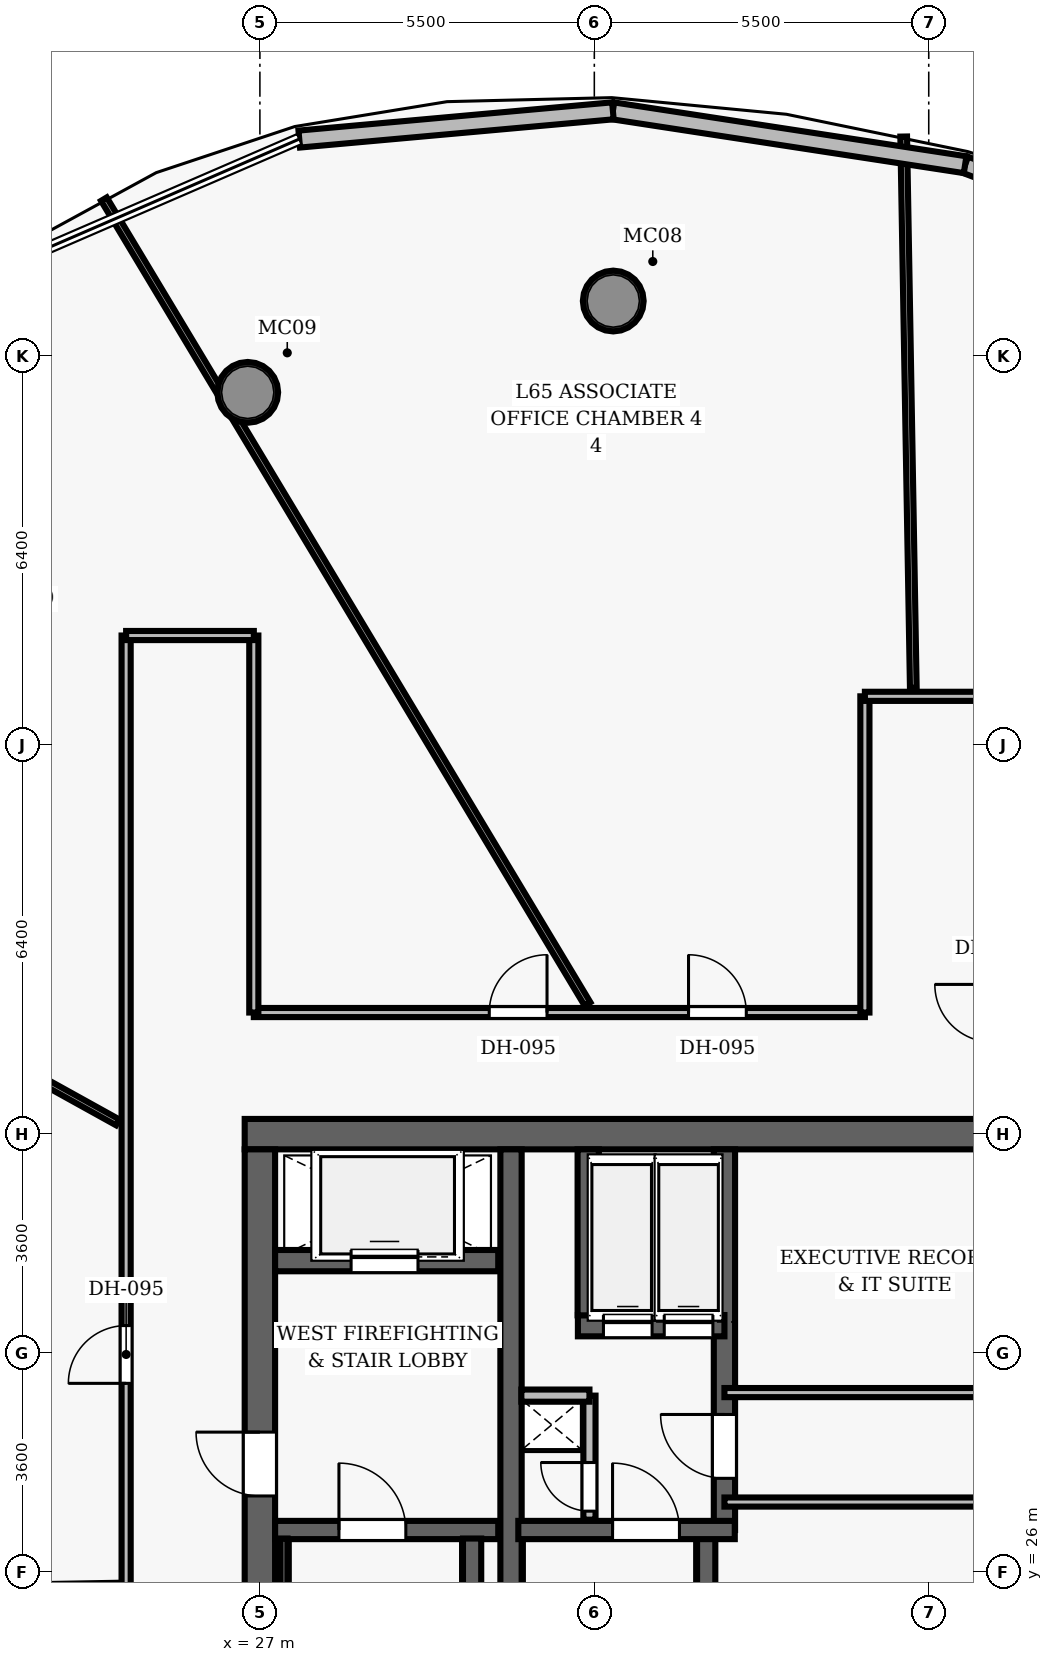
"""IFC4 building model, lengths in metres.
Left out: names, types, materials, properties, quantities, classifications, styles, units other than length and angle.
Written with IfcOpenShell. Run it as: python <this file> out.ifc"""

import sys

from ifc_helpers import new_model, si_unit, direction, frame, frame_2d, origin, origin_2d, place, context, subcontext, project, spatial, rectangle, hollow_circle, extrude, element, fill, save


model = new_model("IFC4")
c1 = context("Model", 3, precision=1e-05, world=origin(), true_north=direction((0.0, 1.0)))
c2 = subcontext(c1, "Body", "Model", "MODEL_VIEW")
j1 = project(units=[si_unit("LENGTHUNIT", "METRE"), si_unit("PLANEANGLEUNIT", "RADIAN")], contexts=[c1])
p1 = place(None, origin())
s1 = spatial("IfcSite", under=j1, at=p1, CompositionType="ELEMENT")
p2 = place(p1, origin())
s2 = spatial("IfcBuilding", under=s1, at=p2, CompositionType="ELEMENT")
p3 = place(p2, frame((0.0, 0.0, 257.45)))
s3 = spatial("IfcBuildingStorey", under=s2, at=p3, CompositionType="ELEMENT", Elevation=257.45)
p4 = place(p3, frame((26.75, 33.2, 0.0), z_axis=(0.0, 0.0, 1.0), x_axis=(1.0, 0.0, 0.0)))
e1 = element("IfcWall", 1, at=p4, inside=s3, PredefinedType="SHEAR", context=c2, shape_type="SweptSolid", body=[
    extrude(rectangle(XDim=22.5, YDim=0.5, at=frame_2d((11.25, 0.0))), origin(), (0.0, 0.0, 1.0), 3.85),
])
p5 = place(p3, frame((27.0, 19.05, 0.0), z_axis=(0.0, 0.0, 1.0), x_axis=(0.0, 1.0, 0.0)))
e2 = element("IfcWall", 2, at=p5, inside=s3, PredefinedType="SHEAR", context=c2, shape_type="SweptSolid", body=[
    extrude(rectangle(XDim=13.9, YDim=0.5, at=frame_2d((6.95, 0.0))), origin(), (0.0, 0.0, 1.0), 3.85),
])
p6 = place(p5, frame((8.2, 0.0, 0.0)))
e3 = element("IfcOpeningElement", 3, at=p6, cuts=e2, PredefinedType="OPENING", context=c2, shape_type="SweptSolid", body=[
    extrude(rectangle(XDim=1.05, YDim=2.15, at=frame_2d((0.525, 1.075))), frame((0.0, 0.26, 0.0), z_axis=(0.0, -1.0, 0.0), x_axis=(1.0, 0.0, 0.0)), (0.0, 0.0, 1.0), 0.52),
])
p7 = place(p3, frame((31.13, 19.05, 0.0), z_axis=(0.0, 0.0, 1.0), x_axis=(0.0, 1.0, 0.0)))
e4 = element("IfcWall", 4, at=p7, inside=s3, PredefinedType="SHEAR", context=c2, shape_type="SweptSolid", body=[
    extrude(rectangle(XDim=13.9, YDim=0.35, at=frame_2d((6.95, 0.0))), origin(), (0.0, 0.0, 1.0), 3.85),
])
for number, where, z_axis, x_axis in (
    (5, (32.812, 46.901, 0.0), (0.0, 0.0, 1.0), (1.0, 0.0, 0.0)),
    (6, (26.8, 45.399, 0.0), (0.0, 0.0, 1.0), (1.0, 0.0, 0.0)),
):
    element("IfcColumn", number, at=place(p3, frame(where, z_axis=z_axis, x_axis=x_axis)), inside=s3, PredefinedType="COLUMN", context=c2, shape_type="SweptSolid", body=[
        extrude(hollow_circle(Radius=0.5, WallThickness=0.045, at=origin_2d()), origin(), (0.0, 0.0, 1.0), 3.85),
    ])
p8 = place(p3, frame((27.25, 26.69, 0.0), z_axis=(0.0, 0.0, 1.0), x_axis=(1.0, 0.0, 0.0)))
e7 = element("IfcWall", 7, at=p8, inside=s3, PredefinedType="SHEAR", context=c2, shape_type="SweptSolid", body=[
    extrude(rectangle(XDim=3.67, YDim=0.3, at=frame_2d((1.835, 0.0))), origin(), (0.0, 0.0, 1.0), 3.85),
])
p9 = place(p8, frame((1.05, 0.0, 0.0)))
e8 = element("IfcOpeningElement", 8, at=p9, cuts=e7, PredefinedType="OPENING", context=c2, shape_type="SweptSolid", body=[
    extrude(rectangle(XDim=1.1, YDim=2.15, at=frame_2d((0.55, 1.075))), frame((0.0, 0.16, 0.0), z_axis=(0.0, -1.0, 0.0), x_axis=(1.0, 0.0, 0.0)), (0.0, 0.0, 1.0), 0.32),
])
p10 = place(p3, frame((30.49, 19.05, 0.0), z_axis=(0.0, 0.0, 1.0), x_axis=(0.0, 1.0, 0.0)))
e9 = element("IfcWall", 9, at=p10, inside=s3, PredefinedType="SHEAR", context=c2, shape_type="SweptSolid", body=[
    extrude(rectangle(XDim=7.5, YDim=0.3, at=frame_2d((3.75, 0.0))), origin(), (0.0, 0.0, 1.0), 3.85),
])
p11 = place(p3, frame((27.395, 19.1, 0.0), z_axis=(0.0, 0.0, 1.0), x_axis=(0.0, 1.0, 0.0)))
e10 = element("IfcWall", 10, at=p11, inside=s3, PredefinedType="SHEAR", context=c2, shape_type="SweptSolid", body=[
    extrude(rectangle(XDim=7.45, YDim=0.12, at=frame_2d((3.725, 0.0))), origin(), (0.0, 0.0, 1.0), 3.85),
])
p12 = place(p3, frame((27.25, 31.12, 0.0), z_axis=(0.0, 0.0, 1.0), x_axis=(1.0, 0.0, 0.0)))
e11 = element("IfcWall", 11, at=p12, inside=s3, PredefinedType="SHEAR", context=c2, shape_type="SweptSolid", body=[
    extrude(rectangle(XDim=3.67, YDim=0.35, at=frame_2d((1.835, 0.0))), origin(), (0.0, 0.0, 1.0), 3.04),
])
p13 = place(p12, frame((1.25, 0.0, 0.0)))
e12 = element("IfcOpeningElement", 12, at=p13, cuts=e11, PredefinedType="OPENING", context=c2, shape_type="SweptSolid", body=[
    extrude(rectangle(XDim=1.1, YDim=2.15, at=frame_2d((0.55, 1.075))), frame((0.0, 0.185, 0.0), z_axis=(0.0, -1.0, 0.0), x_axis=(1.0, 0.0, 0.0)), (0.0, 0.0, 1.0), 0.37),
])
p14 = place(p3, frame((34.34, 19.05, 0.0), z_axis=(0.0, 0.0, 1.0), x_axis=(0.0, 1.0, 0.0)))
e13 = element("IfcWall", 13, at=p14, inside=s3, PredefinedType="SHEAR", context=c2, shape_type="SweptSolid", body=[
    extrude(rectangle(XDim=7.5, YDim=0.3, at=frame_2d((3.75, 0.0))), origin(), (0.0, 0.0, 1.0), 3.85),
])
p15 = place(p3, frame((34.64, 26.69, 0.0), z_axis=(0.0, 0.0, 1.0), x_axis=(0.0, 1.0, 0.0)))
e14 = element("IfcWall", 14, at=p15, inside=s3, PredefinedType="SHEAR", context=c2, shape_type="SweptSolid", body=[
    extrude(rectangle(XDim=6.26, YDim=0.35, at=frame_2d((3.13, 0.0))), origin(), (0.0, 0.0, 1.0), 3.85),
])
p16 = place(p15, frame((0.85, 0.0, 0.0)))
e15 = element("IfcOpeningElement", 15, at=p16, cuts=e14, PredefinedType="OPENING", context=c2, shape_type="SweptSolid", body=[
    extrude(rectangle(XDim=1.05, YDim=2.15, at=frame_2d((0.525, 1.075))), frame((0.0, 0.185, 0.0), z_axis=(0.0, -1.0, 0.0), x_axis=(1.0, 0.0, 0.0)), (0.0, 0.0, 1.0), 0.37),
])
p17 = place(p3, frame((31.25, 26.69, 0.0), z_axis=(0.0, 0.0, 1.0), x_axis=(1.0, 0.0, 0.0)))
e16 = element("IfcWall", 16, at=p17, inside=s3, PredefinedType="SHEAR", context=c2, shape_type="SweptSolid", body=[
    extrude(rectangle(XDim=3.56, YDim=0.3, at=frame_2d((1.78, 0.0))), origin(), (0.0, 0.0, 1.0), 3.85),
])
p18 = place(p17, frame((1.55, 0.0, 0.0)))
e17 = element("IfcOpeningElement", 17, at=p18, cuts=e16, PredefinedType="OPENING", context=c2, shape_type="SweptSolid", body=[
    extrude(rectangle(XDim=1.1, YDim=2.15, at=frame_2d((0.55, 1.075))), frame((0.0, 0.16, 0.0), z_axis=(0.0, -1.0, 0.0), x_axis=(1.0, 0.0, 0.0)), (0.0, 0.0, 1.0), 0.32),
])
p19 = place(p3, frame((32.23, 30.05, 0.0), z_axis=(0.0, 0.0, 1.0), x_axis=(1.0, 0.0, 0.0)))
e18 = element("IfcWall", 18, at=p19, inside=s3, PredefinedType="SHEAR", context=c2, shape_type="SweptSolid", body=[
    extrude(rectangle(XDim=2.41, YDim=0.35, at=frame_2d((1.205, 0.0))), origin(), (0.0, 0.0, 1.0), 3.04),
])
p20 = place(p19, frame((0.42, 0.0, 0.0)))
e19 = element("IfcOpeningElement", 19, at=p20, cuts=e18, PredefinedType="OPENING", context=c2, shape_type="SweptSolid", body=[
    extrude(rectangle(XDim=0.8, YDim=2.15, at=frame_2d((0.4, 1.075))), frame((0.0, 0.185, 0.0), z_axis=(0.0, -1.0, 0.0), x_axis=(1.0, 0.0, 0.0)), (0.0, 0.0, 1.0), 0.37),
])
p21 = place(p19, frame((1.42, 0.0, 0.0)))
e20 = element("IfcOpeningElement", 20, at=p21, cuts=e18, PredefinedType="OPENING", context=c2, shape_type="SweptSolid", body=[
    extrude(rectangle(XDim=0.8, YDim=2.15, at=frame_2d((0.4, 1.075))), frame((0.0, 0.185, 0.0), z_axis=(0.0, -1.0, 0.0), x_axis=(1.0, 0.0, 0.0)), (0.0, 0.0, 1.0), 0.37),
])
p22 = place(p3, frame((32.4, 30.22, 0.0), z_axis=(0.0, 0.0, 1.0), x_axis=(0.0, 1.0, 0.0)))
e21 = element("IfcWall", 21, at=p22, inside=s3, PredefinedType="SHEAR", context=c2, shape_type="SweptSolid", body=[
    extrude(rectangle(XDim=2.73, YDim=0.35, at=frame_2d((1.365, 0.0))), origin(), (0.0, 0.0, 1.0), 3.04),
])
p23 = place(p3, frame((32.42, 26.86, 0.0), z_axis=(0.0, 0.0, 1.0), x_axis=(0.0, 1.0, 0.0)))
e22 = element("IfcWall", 22, at=p23, inside=s3, PredefinedType="PARTITIONING", context=c2, shape_type="SweptSolid", body=[
    extrude(rectangle(XDim=2.04, YDim=0.2, at=frame_2d((1.02, 0.0))), origin(), (0.0, 0.0, 1.0), 3.04),
])
p24 = place(p23, frame((0.14, 0.0, 0.0)))
e23 = element("IfcOpeningElement", 23, at=p24, cuts=e22, PredefinedType="OPENING", context=c2, shape_type="SweptSolid", body=[
    extrude(rectangle(XDim=0.8, YDim=2.05, at=frame_2d((0.4, 1.025))), frame((0.0, 0.11, 0.0), z_axis=(0.0, -1.0, 0.0), x_axis=(1.0, 0.0, 0.0)), (0.0, 0.0, 1.0), 0.22),
])
p25 = place(p3, frame((31.3, 28.9, 0.0), z_axis=(0.0, 0.0, 1.0), x_axis=(1.0, 0.0, 0.0)))
e24 = element("IfcWall", 24, at=p25, inside=s3, PredefinedType="PARTITIONING", context=c2, shape_type="SweptSolid", body=[
    extrude(rectangle(XDim=1.12, YDim=0.2, at=frame_2d((0.56, 0.0))), origin(), (0.0, 0.0, 1.0), 3.04),
])
for number, where, z_axis, x_axis in (
    (25, (34.64, 27.15, 0.0), (0.0, 0.0, 1.0), (1.0, 0.0, 0.0)),
    (26, (34.64, 28.95, 0.0), (0.0, 0.0, 1.0), (1.0, 0.0, 0.0)),
):
    element("IfcWall", number, at=place(p3, frame(where, z_axis=z_axis, x_axis=x_axis)), inside=s3, PredefinedType="PARTITIONING", context=c2, shape_type="SweptSolid", body=[
        extrude(rectangle(XDim=6.36, YDim=0.15, at=frame_2d((3.18, 0.0))), origin(), (0.0, 0.0, 1.0), 3.04),
    ])
p26 = place(p3, frame((26.9, 35.2, 0.0), z_axis=(0.0, 0.0, 1.0), x_axis=(1.0, 0.0, 0.0)))
e27 = element("IfcWall", 27, at=p26, inside=s3, PredefinedType="PARTITIONING", context=c2, shape_type="SweptSolid", body=[
    extrude(rectangle(XDim=10.05, YDim=0.15, at=frame_2d((5.025, 0.0))), origin(), (0.0, 0.0, 1.0), 3.04),
])
p27 = place(p26, frame((7.149, 0.0, 0.0)))
e28 = element("IfcOpeningElement", 28, at=p27, cuts=e27, PredefinedType="OPENING", context=c2, shape_type="SweptSolid", body=[
    extrude(rectangle(XDim=0.95, YDim=2.15, at=frame_2d((0.475, 1.075))), frame((0.0, 0.085, 0.0), z_axis=(0.0, -1.0, 0.0), x_axis=(1.0, 0.0, 0.0)), (0.0, 0.0, 1.0), 0.17),
])
p28 = place(p26, frame((3.872, 0.0, 0.0)))
e29 = element("IfcOpeningElement", 29, at=p28, cuts=e27, PredefinedType="OPENING", context=c2, shape_type="SweptSolid", body=[
    extrude(rectangle(XDim=0.95, YDim=2.15, at=frame_2d((0.475, 1.075))), frame((0.0, 0.085, 0.0), z_axis=(0.0, -1.0, 0.0), x_axis=(1.0, 0.0, 0.0)), (0.0, 0.0, 1.0), 0.17),
])
p29 = place(p3, frame((24.8, 11.321, 0.0), z_axis=(0.0, 0.0, 1.0), x_axis=(0.0, 1.0, 0.0)))
e30 = element("IfcWall", 30, at=p29, inside=s3, PredefinedType="PARTITIONING", context=c2, shape_type="SweptSolid", body=[
    extrude(rectangle(XDim=30.079, YDim=0.15, at=frame_2d((15.039, 0.0))), origin(), (0.0, 0.0, 1.0), 3.04),
])
p30 = place(p29, frame((17.781, 0.0, 0.0)))
e31 = element("IfcOpeningElement", 31, at=p30, cuts=e30, PredefinedType="OPENING", context=c2, shape_type="SweptSolid", body=[
    extrude(rectangle(XDim=0.95, YDim=2.15, at=frame_2d((0.475, 1.075))), frame((0.0, 0.085, 0.0), z_axis=(0.0, -1.0, 0.0), x_axis=(1.0, 0.0, 0.0)), (0.0, 0.0, 1.0), 0.17),
])
p31 = place(p29, frame((11.339, 0.0, 0.0)))
e32 = element("IfcOpeningElement", 32, at=p31, cuts=e30, PredefinedType="OPENING", context=c2, shape_type="SweptSolid", body=[
    extrude(rectangle(XDim=0.95, YDim=2.15, at=frame_2d((0.475, 1.075))), frame((0.0, 0.085, 0.0), z_axis=(0.0, -1.0, 0.0), x_axis=(1.0, 0.0, 0.0)), (0.0, 0.0, 1.0), 0.17),
])
p32 = place(p3, frame((26.9, 35.2, 0.0), z_axis=(0.0, 0.0, 1.0), x_axis=(0.0, 1.0, 0.0)))
e33 = element("IfcWall", 33, at=p32, inside=s3, PredefinedType="PARTITIONING", context=c2, shape_type="SweptSolid", body=[
    extrude(rectangle(XDim=6.2, YDim=0.15, at=frame_2d((3.1, 0.0))), origin(), (0.0, 0.0, 1.0), 3.04),
])
p33 = place(p3, frame((24.8, 41.4, 0.0), z_axis=(0.0, 0.0, 1.0), x_axis=(1.0, 0.0, 0.0)))
e34 = element("IfcWall", 34, at=p33, inside=s3, PredefinedType="PARTITIONING", context=c2, shape_type="SweptSolid", body=[
    extrude(rectangle(XDim=2.1, YDim=0.15, at=frame_2d((1.05, 0.0))), origin(), (0.0, 0.0, 1.0), 3.04),
])
p34 = place(p3, frame((36.95, 35.2, 0.0), z_axis=(0.0, 0.0, 1.0), x_axis=(0.0, 1.0, 0.0)))
e35 = element("IfcWall", 35, at=p34, inside=s3, PredefinedType="PARTITIONING", context=c2, shape_type="SweptSolid", body=[
    extrude(rectangle(XDim=5.2, YDim=0.15, at=frame_2d((2.6, 0.0))), origin(), (0.0, 0.0, 1.0), 3.04),
])
p35 = place(p3, frame((36.95, 40.4, 0.0), z_axis=(0.0, 0.0, 1.0), x_axis=(1.0, 0.0, 0.0)))
e36 = element("IfcWall", 36, at=p35, inside=s3, PredefinedType="PARTITIONING", context=c2, shape_type="SweptSolid", body=[
    extrude(rectangle(XDim=2.1, YDim=0.15, at=frame_2d((1.05, 0.0))), origin(), (0.0, 0.0, 1.0), 3.04),
])
p36 = place(p3, frame((37.746, 40.54, 0.0), z_axis=(0.0, 0.0, 1.0), x_axis=(-0.01744812848, 0.999847769819, 0.0)))
e37 = element("IfcWall", 37, at=p36, inside=s3, PredefinedType="PARTITIONING", context=c2, shape_type="SweptSolid", body=[
    extrude(rectangle(XDim=9.067, YDim=0.11, at=frame_2d((4.534, 0.0))), origin(), (0.0, 0.0, 1.0), 3.04),
])
p37 = place(p3, frame((32.388, 35.34, 0.0), z_axis=(0.0, 0.0, 1.0), x_axis=(-0.515039699053, 0.857166324817, 0.0)))
e38 = element("IfcWall", 38, at=p37, inside=s3, PredefinedType="PARTITIONING", context=c2, shape_type="SweptSolid", body=[
    extrude(rectangle(XDim=15.442, YDim=0.11, at=frame_2d((7.721, 0.0))), origin(), (0.0, 0.0, 1.0), 3.04),
])
p38 = place(p3, frame((24.66, 33.395, 0.0), z_axis=(0.0, 0.0, 1.0), x_axis=(-0.874619863553, 0.484809338069, 0.0)))
e39 = element("IfcWall", 39, at=p38, inside=s3, PredefinedType="PARTITIONING", context=c2, shape_type="SweptSolid", body=[
    extrude(rectangle(XDim=8.979, YDim=0.11, at=frame_2d((4.49, 0.0))), origin(), (0.0, 0.0, 1.0), 3.04),
])
p39 = place(p3, frame((24.66, 25.767, 0.0), z_axis=(0.0, 0.0, 1.0), x_axis=(-0.99984806608, -0.017431143282, 0.0)))
e40 = element("IfcWall", 40, at=p39, inside=s3, PredefinedType="PARTITIONING", context=c2, shape_type="SweptSolid", body=[
    extrude(rectangle(XDim=8.446, YDim=0.11, at=frame_2d((4.223, 0.0))), origin(), (0.0, 0.0, 1.0), 3.04),
])
p40 = place(p3, frame((38.598, 49.143, 0.0), z_axis=(0.0, 0.0, 1.0), x_axis=(0.935625218408, -0.352994972597, 0.0)))
e41 = element("IfcWall", 41, at=p40, inside=s3, PredefinedType="SOLIDWALL", context=c2, shape_type="SweptSolid", body=[
    extrude(rectangle(XDim=6.345, YDim=0.28, at=frame_2d((3.172, 0.0))), origin(), (0.0, 0.0, 1.0), 3.625),
])
p41 = place(p3, frame((32.806, 50.029, 0.0), z_axis=(0.0, 0.0, 1.0), x_axis=(0.98850473066, -0.151189938364, 0.0)))
e42 = element("IfcWall", 42, at=p41, inside=s3, PredefinedType="SOLIDWALL", context=c2, shape_type="SweptSolid", body=[
    extrude(rectangle(XDim=5.86, YDim=0.28, at=frame_2d((2.93, 0.0))), origin(), (0.0, 0.0, 1.0), 3.625),
])
p42 = place(p3, frame((27.647, 49.564, 0.0), z_axis=(0.0, 0.0, 1.0), x_axis=(0.9959685872, 0.089702693996, 0.0)))
e43 = element("IfcWall", 43, at=p42, inside=s3, PredefinedType="SOLIDWALL", context=c2, shape_type="SweptSolid", body=[
    extrude(rectangle(XDim=5.179, YDim=0.28, at=frame_2d((2.59, 0.0))), origin(), (0.0, 0.0, 1.0), 3.625),
])
p43 = place(p9, origin())
e44 = element("IfcDoor", 44, at=p43, inside=s3, OperationType="SINGLE_SWING_LEFT", PredefinedType="DOOR", context=c2, shape_type="SweptSolid", body=[
    extrude(rectangle(XDim=1.1, YDim=2.15, at=frame_2d((0.55, 1.075))), frame((0.0, 0.025, 0.0), z_axis=(0.0, -1.0, 0.0), x_axis=(1.0, 0.0, 0.0)), (0.0, 0.0, 1.0), 0.05),
])
fill(e8, e44)
p44 = place(p6, origin())
e45 = element("IfcDoor", 45, at=p44, inside=s3, OperationType="SINGLE_SWING_RIGHT", PredefinedType="DOOR", context=c2, shape_type="SweptSolid", body=[
    extrude(rectangle(XDim=1.05, YDim=2.15, at=frame_2d((0.525, 1.075))), frame((0.0, 0.025, 0.0), z_axis=(0.0, -1.0, 0.0), x_axis=(1.0, 0.0, 0.0)), (0.0, 0.0, 1.0), 0.05),
])
fill(e3, e45)
p45 = place(p18, origin())
e46 = element("IfcDoor", 46, at=p45, inside=s3, OperationType="SINGLE_SWING_LEFT", PredefinedType="DOOR", context=c2, shape_type="SweptSolid", body=[
    extrude(rectangle(XDim=1.1, YDim=2.15, at=frame_2d((0.55, 1.075))), frame((0.0, 0.025, 0.0), z_axis=(0.0, -1.0, 0.0), x_axis=(1.0, 0.0, 0.0)), (0.0, 0.0, 1.0), 0.05),
])
fill(e17, e46)
p46 = place(p24, origin())
e47 = element("IfcDoor", 47, at=p46, inside=s3, OperationType="SINGLE_SWING_RIGHT", PredefinedType="DOOR", context=c2, shape_type="SweptSolid", body=[
    extrude(rectangle(XDim=0.8, YDim=2.05, at=frame_2d((0.4, 1.025))), frame((0.0, 0.025, 0.0), z_axis=(0.0, -1.0, 0.0), x_axis=(1.0, 0.0, 0.0)), (0.0, 0.0, 1.0), 0.05),
])
fill(e23, e47)
p47 = place(p16, origin())
e48 = element("IfcDoor", 48, at=p47, inside=s3, OperationType="SINGLE_SWING_RIGHT", PredefinedType="DOOR", context=c2, shape_type="SweptSolid", body=[
    extrude(rectangle(XDim=1.05, YDim=2.15, at=frame_2d((0.525, 1.075))), frame((0.0, 0.025, 0.0), z_axis=(0.0, -1.0, 0.0), x_axis=(1.0, 0.0, 0.0)), (0.0, 0.0, 1.0), 0.05),
])
fill(e15, e48)
p48 = place(p27, origin())
e49 = element("IfcDoor", 49, at=p48, inside=s3, OperationType="SINGLE_SWING_LEFT", PredefinedType="DOOR", context=c2, shape_type="SweptSolid", body=[
    extrude(rectangle(XDim=0.95, YDim=2.15, at=frame_2d((0.475, 1.075))), frame((0.0, 0.025, 0.0), z_axis=(0.0, -1.0, 0.0), x_axis=(1.0, 0.0, 0.0)), (0.0, 0.0, 1.0), 0.05),
])
fill(e28, e49)
p49 = place(p28, origin())
e50 = element("IfcDoor", 50, at=p49, inside=s3, OperationType="SINGLE_SWING_RIGHT", PredefinedType="DOOR", context=c2, shape_type="SweptSolid", body=[
    extrude(rectangle(XDim=0.95, YDim=2.15, at=frame_2d((0.475, 1.075))), frame((0.0, 0.025, 0.0), z_axis=(0.0, -1.0, 0.0), x_axis=(1.0, 0.0, 0.0)), (0.0, 0.0, 1.0), 0.05),
])
fill(e29, e50)
p50 = place(p30, origin())
e51 = element("IfcDoor", 51, at=p50, inside=s3, OperationType="SINGLE_SWING_LEFT", PredefinedType="DOOR", context=c2, shape_type="SweptSolid", body=[
    extrude(rectangle(XDim=0.95, YDim=2.15, at=frame_2d((0.475, 1.075))), frame((0.0, 0.025, 0.0), z_axis=(0.0, -1.0, 0.0), x_axis=(1.0, 0.0, 0.0)), (0.0, 0.0, 1.0), 0.05),
])
fill(e31, e51)
p51 = place(p13, origin())
e52 = element("IfcDoor", 52, at=p51, inside=s3, OperationType="SLIDING_TO_LEFT", PredefinedType="DOOR", context=c2, shape_type="SweptSolid", body=[
    extrude(rectangle(XDim=1.1, YDim=2.15, at=frame_2d((0.55, 1.075))), frame((0.0, 0.025, 0.0), z_axis=(0.0, -1.0, 0.0), x_axis=(1.0, 0.0, 0.0)), (0.0, 0.0, 1.0), 0.05),
])
fill(e12, e52)
p52 = place(p20, origin())
e53 = element("IfcDoor", 53, at=p52, inside=s3, OperationType="SLIDING_TO_LEFT", PredefinedType="DOOR", context=c2, shape_type="SweptSolid", body=[
    extrude(rectangle(XDim=0.8, YDim=2.15, at=frame_2d((0.4, 1.075))), frame((0.0, 0.025, 0.0), z_axis=(0.0, -1.0, 0.0), x_axis=(1.0, 0.0, 0.0)), (0.0, 0.0, 1.0), 0.05),
])
fill(e19, e53)
p53 = place(p21, origin())
e54 = element("IfcDoor", 54, at=p53, inside=s3, OperationType="SLIDING_TO_LEFT", PredefinedType="DOOR", context=c2, shape_type="SweptSolid", body=[
    extrude(rectangle(XDim=0.8, YDim=2.15, at=frame_2d((0.4, 1.075))), frame((0.0, 0.025, 0.0), z_axis=(0.0, -1.0, 0.0), x_axis=(1.0, 0.0, 0.0)), (0.0, 0.0, 1.0), 0.05),
])
fill(e20, e54)
save(model, sys.argv[1])
